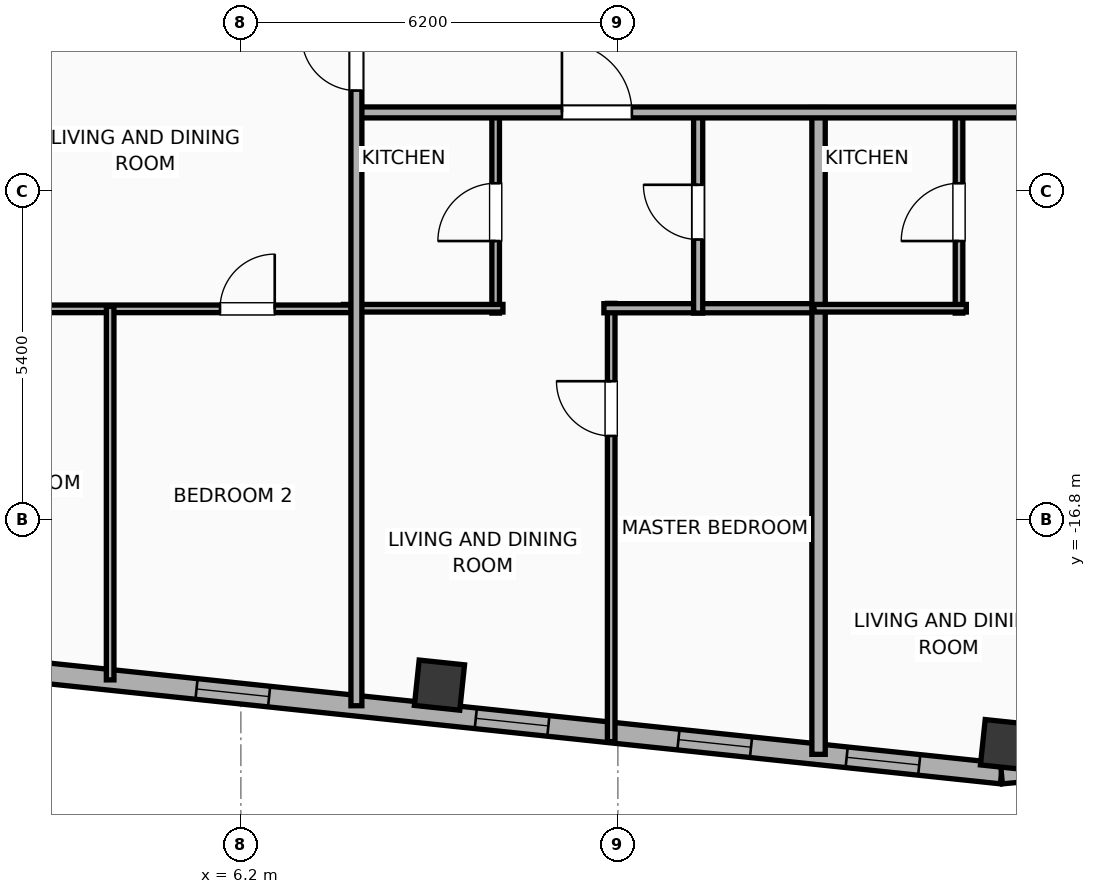
"""IFC4 building model, lengths in metres.
Left out: names, types, materials, properties, quantities, classifications, styles, units other than length and angle.
Written with IfcOpenShell. Run it as: python <this file> out.ifc"""

import sys

from ifc_helpers import new_model, si_unit, direction, frame, frame_2d, origin, origin_2d, place, context, subcontext, project, spatial, rectangle, hollow_rectangle, extrude, element, fill, save


model = new_model("IFC4")
c1 = context("Model", 3, precision=1e-05, world=origin(), true_north=direction((0.0, 1.0)))
c2 = subcontext(c1, "Body", "Model", "MODEL_VIEW")
j1 = project(units=[si_unit("LENGTHUNIT", "METRE"), si_unit("PLANEANGLEUNIT", "RADIAN")], contexts=[c1])
p1 = place(None, origin())
s1 = spatial("IfcSite", under=j1, at=p1, CompositionType="ELEMENT")
p2 = place(p1, origin())
s2 = spatial("IfcBuilding", under=s1, at=p2, CompositionType="ELEMENT")
p3 = place(p2, frame((0.0, 0.0, 271.7)))
s3 = spatial("IfcBuildingStorey", under=s2, at=p3, CompositionType="ELEMENT", Elevation=271.7)
for number, where, z_axis, x_axis in (
    (1, (9.466, -19.518, 0.0), (0.0, 0.0, 1.0), (0.995, -0.105, 0.0)),
    (2, (18.775, -20.497, 0.0), (0.0, 0.0, 1.0), (0.995, -0.105, 0.0)),
):
    element("IfcColumn", number, at=place(p3, frame(where, z_axis=z_axis, x_axis=x_axis)), inside=s3, PredefinedType="COLUMN", context=c2, shape_type="SweptSolid", body=[
        extrude(hollow_rectangle(XDim=0.75, YDim=0.75, WallThickness=0.025, at=origin_2d()), origin(), (0.0, 0.0, 1.0), 3.9),
    ])
p4 = place(p3, frame((18.708, -20.972, 0.0), z_axis=(0.0, 0.0, 1.0), x_axis=(-0.994521888554, 0.104528528102, 0.0)))
e3 = element("IfcWall", 3, at=p4, inside=s3, PredefinedType="ELEMENTEDWALL", context=c2, shape_type="SweptSolid", body=[
    extrude(rectangle(XDim=46.766, YDim=0.34, at=frame_2d((23.383, 0.0))), origin(), (0.0, 0.0, 1.0), 3.65),
])
p5 = place(p4, frame((23.833, 0.0, 0.75)))
e4 = element("IfcOpeningElement", 4, at=p5, cuts=e3, PredefinedType="OPENING", context=c2, shape_type="SweptSolid", body=[
    extrude(rectangle(XDim=2.4, YDim=2.1, at=frame_2d((1.2, 1.05))), frame((0.0, 0.18, 0.0), z_axis=(0.0, -1.0, 0.0), x_axis=(1.0, 0.0, 0.0)), (0.0, 0.0, 1.0), 0.36),
])
p6 = place(p4, frame((38.622, 0.0, 0.75)))
e5 = element("IfcOpeningElement", 5, at=p6, cuts=e3, PredefinedType="OPENING", context=c2, shape_type="SweptSolid", body=[
    extrude(rectangle(XDim=2.4, YDim=2.1, at=frame_2d((1.2, 1.05))), frame((0.0, 0.18, 0.0), z_axis=(0.0, -1.0, 0.0), x_axis=(1.0, 0.0, 0.0)), (0.0, 0.0, 1.0), 0.36),
])
p7 = place(p4, frame((44.402, 0.0, 0.75)))
e6 = element("IfcOpeningElement", 6, at=p7, cuts=e3, PredefinedType="OPENING", context=c2, shape_type="SweptSolid", body=[
    extrude(rectangle(XDim=1.2, YDim=2.05, at=frame_2d((0.6, 1.025))), frame((0.0, 0.18, 0.0), z_axis=(0.0, -1.0, 0.0), x_axis=(1.0, 0.0, 0.0)), (0.0, 0.0, 1.0), 0.36),
])
p8 = place(p4, frame((42.419, 0.0, 0.75)))
e7 = element("IfcOpeningElement", 7, at=p8, cuts=e3, PredefinedType="OPENING", context=c2, shape_type="SweptSolid", body=[
    extrude(rectangle(XDim=1.2, YDim=2.05, at=frame_2d((0.6, 1.025))), frame((0.0, 0.18, 0.0), z_axis=(0.0, -1.0, 0.0), x_axis=(1.0, 0.0, 0.0)), (0.0, 0.0, 1.0), 0.36),
])
p9 = place(p4, frame((34.933, 0.0, 0.75)))
e8 = element("IfcOpeningElement", 8, at=p9, cuts=e3, PredefinedType="OPENING", context=c2, shape_type="SweptSolid", body=[
    extrude(rectangle(XDim=1.2, YDim=2.05, at=frame_2d((0.6, 1.025))), frame((0.0, 0.18, 0.0), z_axis=(0.0, -1.0, 0.0), x_axis=(1.0, 0.0, 0.0)), (0.0, 0.0, 1.0), 0.36),
])
p10 = place(p4, frame((28.692, 0.0, 0.75)))
e9 = element("IfcOpeningElement", 9, at=p10, cuts=e3, PredefinedType="OPENING", context=c2, shape_type="SweptSolid", body=[
    extrude(rectangle(XDim=1.2, YDim=2.05, at=frame_2d((0.6, 1.025))), frame((0.0, 0.18, 0.0), z_axis=(0.0, -1.0, 0.0), x_axis=(1.0, 0.0, 0.0)), (0.0, 0.0, 1.0), 0.36),
])
p11 = place(p4, frame((30.957, 0.0, 0.75)))
e10 = element("IfcOpeningElement", 10, at=p11, cuts=e3, PredefinedType="OPENING", context=c2, shape_type="SweptSolid", body=[
    extrude(rectangle(XDim=1.2, YDim=2.05, at=frame_2d((0.6, 1.025))), frame((0.0, 0.18, 0.0), z_axis=(0.0, -1.0, 0.0), x_axis=(1.0, 0.0, 0.0)), (0.0, 0.0, 1.0), 0.36),
])
p12 = place(p4, frame((7.492, 0.0, 0.75)))
e11 = element("IfcOpeningElement", 11, at=p12, cuts=e3, PredefinedType="OPENING", context=c2, shape_type="SweptSolid", body=[
    extrude(rectangle(XDim=1.2, YDim=2.05, at=frame_2d((0.6, 1.025))), frame((0.0, 0.18, 0.0), z_axis=(0.0, -1.0, 0.0), x_axis=(1.0, 0.0, 0.0)), (0.0, 0.0, 1.0), 0.36),
])
p13 = place(p4, frame((4.141, 0.0, 0.75)))
e12 = element("IfcOpeningElement", 12, at=p13, cuts=e3, PredefinedType="OPENING", context=c2, shape_type="SweptSolid", body=[
    extrude(rectangle(XDim=1.2, YDim=2.05, at=frame_2d((0.6, 1.025))), frame((0.0, 0.18, 0.0), z_axis=(0.0, -1.0, 0.0), x_axis=(1.0, 0.0, 0.0)), (0.0, 0.0, 1.0), 0.36),
])
p14 = place(p4, frame((1.36, 0.0, 0.75)))
e13 = element("IfcOpeningElement", 13, at=p14, cuts=e3, PredefinedType="OPENING", context=c2, shape_type="SweptSolid", body=[
    extrude(rectangle(XDim=1.2, YDim=2.05, at=frame_2d((0.6, 1.025))), frame((0.0, 0.18, 0.0), z_axis=(0.0, -1.0, 0.0), x_axis=(1.0, 0.0, 0.0)), (0.0, 0.0, 1.0), 0.36),
])
p15 = place(p4, frame((20.254, 0.0, 0.75)))
e14 = element("IfcOpeningElement", 14, at=p15, cuts=e3, PredefinedType="OPENING", context=c2, shape_type="SweptSolid", body=[
    extrude(rectangle(XDim=1.2, YDim=2.05, at=frame_2d((0.6, 1.025))), frame((0.0, 0.18, 0.0), z_axis=(0.0, -1.0, 0.0), x_axis=(1.0, 0.0, 0.0)), (0.0, 0.0, 1.0), 0.36),
])
p16 = place(p4, frame((16.172, 0.0, 0.75)))
e15 = element("IfcOpeningElement", 15, at=p16, cuts=e3, PredefinedType="OPENING", context=c2, shape_type="SweptSolid", body=[
    extrude(rectangle(XDim=1.2, YDim=2.05, at=frame_2d((0.6, 1.025))), frame((0.0, 0.18, 0.0), z_axis=(0.0, -1.0, 0.0), x_axis=(1.0, 0.0, 0.0)), (0.0, 0.0, 1.0), 0.36),
])
p17 = place(p4, frame((12.11, 0.0, 0.75)))
e16 = element("IfcOpeningElement", 16, at=p17, cuts=e3, PredefinedType="OPENING", context=c2, shape_type="SweptSolid", body=[
    extrude(rectangle(XDim=1.2, YDim=2.05, at=frame_2d((0.6, 1.025))), frame((0.0, 0.18, 0.0), z_axis=(0.0, -1.0, 0.0), x_axis=(1.0, 0.0, 0.0)), (0.0, 0.0, 1.0), 0.36),
])
p18 = place(p3, frame((20.056, -20.848, 0.0), z_axis=(0.0, 0.0, 1.0), x_axis=(-0.995813013343, -0.091413579172, 0.0)))
e17 = element("IfcWall", 17, at=p18, inside=s3, PredefinedType="ELEMENTEDWALL", context=c2, shape_type="SweptSolid", body=[
    extrude(rectangle(XDim=1.354, YDim=0.34, at=frame_2d((0.677, 0.0))), origin(), (0.0, 0.0, 1.0), 3.65),
])
p19 = place(p3, frame((12.29, -20.448, 0.0), z_axis=(0.0, 0.0, 1.0), x_axis=(0.0, 1.0, 0.0)))
e18 = element("IfcWall", 18, at=p19, inside=s3, PredefinedType="PARTITIONING", context=c2, shape_type="SweptSolid", body=[
    extrude(rectangle(XDim=7.208, YDim=0.125, at=frame_2d((3.604, 0.0))), origin(), (0.0, 0.0, 1.0), 3.65),
])
p20 = place(p19, frame((5.028, 0.0, 0.0)))
e19 = element("IfcOpeningElement", 19, at=p20, cuts=e18, PredefinedType="OPENING", context=c2, shape_type="SweptSolid", body=[
    extrude(rectangle(XDim=0.9, YDim=2.05, at=frame_2d((0.45, 1.025))), frame((0.0, 0.073, 0.0), z_axis=(0.0, -1.0, 0.0), x_axis=(1.0, 0.0, 0.0)), (0.0, 0.0, 1.0), 0.145),
])
p21 = place(p3, frame((12.17, -13.32, 0.0), z_axis=(0.0, 0.0, 1.0), x_axis=(1.0, 0.0, 0.0)))
e20 = element("IfcWall", 20, at=p21, inside=s3, PredefinedType="PLUMBINGWALL", context=c2, shape_type="SweptSolid", body=[
    extrude(rectangle(XDim=3.605, YDim=0.15, at=frame_2d((1.802, 0.0))), origin(), (0.0, 0.0, 1.0), 3.65),
])
p22 = place(p3, frame((10.39, -13.4, 0.0), z_axis=(0.0, 0.0, 1.0), x_axis=(0.0, 1.0, 0.0)))
e21 = element("IfcWall", 21, at=p22, inside=s3, PredefinedType="PARTITIONING", context=c2, shape_type="SweptSolid", body=[
    extrude(rectangle(XDim=3.32, YDim=0.125, at=frame_2d((1.66, 0.0))), origin(), (0.0, 0.0, 1.0), 3.65),
])
p23 = place(p22, frame((1.185, 0.0, 0.0)))
e22 = element("IfcOpeningElement", 22, at=p23, cuts=e21, PredefinedType="OPENING", context=c2, shape_type="SweptSolid", body=[
    extrude(rectangle(XDim=0.95, YDim=2.05, at=frame_2d((0.475, 1.025))), frame((0.0, 0.073, 0.0), z_axis=(0.0, -1.0, 0.0), x_axis=(1.0, 0.0, 0.0)), (0.0, 0.0, 1.0), 0.145),
])
p24 = place(p3, frame((7.887, -13.32, 0.0), z_axis=(0.0, 0.0, 1.0), x_axis=(1.0, 0.0, 0.0)))
e23 = element("IfcWall", 23, at=p24, inside=s3, PredefinedType="PARTITIONING", context=c2, shape_type="SweptSolid", body=[
    extrude(rectangle(XDim=2.623, YDim=0.125, at=frame_2d((1.311, 0.0))), origin(), (0.0, 0.0, 1.0), 3.65),
])
p25 = place(p3, frame((13.72, -13.4, 0.0), z_axis=(0.0, 0.0, 1.0), x_axis=(0.0, 1.0, 0.0)))
e24 = element("IfcWall", 24, at=p25, inside=s3, PredefinedType="PLUMBINGWALL", context=c2, shape_type="SweptSolid", body=[
    extrude(rectangle(XDim=3.32, YDim=0.15, at=frame_2d((1.66, 0.0))), origin(), (0.0, 0.0, 1.0), 3.65),
])
p26 = place(p25, frame((1.21, 0.0, 0.0)))
e25 = element("IfcOpeningElement", 25, at=p26, cuts=e24, PredefinedType="OPENING", context=c2, shape_type="SweptSolid", body=[
    extrude(rectangle(XDim=0.9, YDim=2.05, at=frame_2d((0.45, 1.025))), frame((0.0, 0.085, 0.0), z_axis=(0.0, -1.0, 0.0), x_axis=(1.0, 0.0, 0.0)), (0.0, 0.0, 1.0), 0.17),
])
p27 = place(p3, frame((15.7, -20.656, 0.0), z_axis=(0.0, 0.0, 1.0), x_axis=(0.0, 1.0, 0.0)))
e26 = element("IfcWall", 26, at=p27, inside=s3, PredefinedType="PARTITIONING", context=c2, shape_type="SweptSolid", body=[
    extrude(rectangle(XDim=10.636, YDim=0.22, at=frame_2d((5.318, 0.0))), origin(), (0.0, 0.0, 1.0), 3.65),
])
p28 = place(p3, frame((18.01, -13.4, 0.0), z_axis=(0.0, 0.0, 1.0), x_axis=(0.0, 1.0, 0.0)))
e27 = element("IfcWall", 27, at=p28, inside=s3, PredefinedType="PARTITIONING", context=c2, shape_type="SweptSolid", body=[
    extrude(rectangle(XDim=3.32, YDim=0.125, at=frame_2d((1.66, 0.0))), origin(), (0.0, 0.0, 1.0), 3.65),
])
p29 = place(p28, frame((1.185, 0.0, 0.0)))
e28 = element("IfcOpeningElement", 28, at=p29, cuts=e27, PredefinedType="OPENING", context=c2, shape_type="SweptSolid", body=[
    extrude(rectangle(XDim=0.95, YDim=2.05, at=frame_2d((0.475, 1.025))), frame((0.0, 0.073, 0.0), z_axis=(0.0, -1.0, 0.0), x_axis=(1.0, 0.0, 0.0)), (0.0, 0.0, 1.0), 0.145),
])
p30 = place(p3, frame((15.625, -13.32, 0.0), z_axis=(0.0, 0.0, 1.0), x_axis=(1.0, 0.0, 0.0)))
e29 = element("IfcWall", 29, at=p30, inside=s3, PredefinedType="PARTITIONING", context=c2, shape_type="SweptSolid", body=[
    extrude(rectangle(XDim=2.505, YDim=0.125, at=frame_2d((1.252, 0.0))), origin(), (0.0, 0.0, 1.0), 3.65),
])
p31 = place(p3, frame((8.08, -10.1, 0.0), z_axis=(0.0, 0.0, 1.0), x_axis=(1.0, 0.0, 0.0)))
e30 = element("IfcWall", 30, at=p31, inside=s3, PredefinedType="PARTITIONING", context=c2, shape_type="SweptSolid", body=[
    extrude(rectangle(XDim=15.236, YDim=0.18, at=frame_2d((7.618, 0.0))), origin(), (0.0, 0.0, 1.0), 3.65),
])
p32 = place(p31, frame((3.4, 0.0, 0.0)))
e31 = element("IfcOpeningElement", 31, at=p32, cuts=e30, PredefinedType="OPENING", context=c2, shape_type="SweptSolid", body=[
    extrude(rectangle(XDim=1.15, YDim=2.05, at=frame_2d((0.575, 1.025))), frame((0.0, 0.1, 0.0), z_axis=(0.0, -1.0, 0.0), x_axis=(1.0, 0.0, 0.0)), (0.0, 0.0, 1.0), 0.2),
])
p33 = place(p31, frame((11.05, 0.0, 0.0)))
e32 = element("IfcOpeningElement", 32, at=p33, cuts=e30, PredefinedType="OPENING", context=c2, shape_type="SweptSolid", body=[
    extrude(rectangle(XDim=1.15, YDim=2.05, at=frame_2d((0.575, 1.025))), frame((0.0, 0.1, 0.0), z_axis=(0.0, -1.0, 0.0), x_axis=(1.0, 0.0, 0.0)), (0.0, 0.0, 1.0), 0.2),
])
p34 = place(p3, frame((0.02, -13.33, 0.0), z_axis=(0.0, 0.0, 1.0), x_axis=(1.0, 0.0, 0.0)))
e33 = element("IfcWall", 33, at=p34, inside=s3, PredefinedType="PARTITIONING", context=c2, shape_type="SweptSolid", body=[
    extrude(rectangle(XDim=7.992, YDim=0.125, at=frame_2d((3.996, 0.0))), origin(), (0.0, 0.0, 1.0), 3.65),
])
p35 = place(p34, frame((1.323, 0.0, 0.0)))
e34 = element("IfcOpeningElement", 34, at=p35, cuts=e33, PredefinedType="OPENING", context=c2, shape_type="SweptSolid", body=[
    extrude(rectangle(XDim=0.9, YDim=2.05, at=frame_2d((0.45, 1.025))), frame((0.0, 0.073, 0.0), z_axis=(0.0, -1.0, 0.0), x_axis=(1.0, 0.0, 0.0)), (0.0, 0.0, 1.0), 0.145),
])
p36 = place(p34, frame((5.837, 0.0, 0.0)))
e35 = element("IfcOpeningElement", 35, at=p36, cuts=e33, PredefinedType="OPENING", context=c2, shape_type="SweptSolid", body=[
    extrude(rectangle(XDim=0.9, YDim=2.05, at=frame_2d((0.45, 1.025))), frame((0.0, 0.073, 0.0), z_axis=(0.0, -1.0, 0.0), x_axis=(1.0, 0.0, 0.0)), (0.0, 0.0, 1.0), 0.145),
])
p37 = place(p3, frame((4.05, -19.432, 0.0), z_axis=(0.0, 0.0, 1.0), x_axis=(0.0, 1.0, 0.0)))
e36 = element("IfcWall", 36, at=p37, inside=s3, PredefinedType="PARTITIONING", context=c2, shape_type="SweptSolid", body=[
    extrude(rectangle(XDim=6.142, YDim=0.125, at=frame_2d((3.071, 0.0))), origin(), (0.0, 0.0, 1.0), 3.65),
])
p38 = place(p3, frame((8.1, -19.857, 0.0), z_axis=(0.0, 0.0, 1.0), x_axis=(0.0, 1.0, 0.0)))
e37 = element("IfcWall", 37, at=p38, inside=s3, PredefinedType="PARTITIONING", context=c2, shape_type="SweptSolid", body=[
    extrude(rectangle(XDim=11.367, YDim=0.18, at=frame_2d((5.684, 0.0))), origin(), (0.0, 0.0, 1.0), 3.65),
])
p39 = place(p38, frame((10.117, 0.0, 0.0)))
e38 = element("IfcOpeningElement", 38, at=p39, cuts=e37, PredefinedType="OPENING", context=c2, shape_type="SweptSolid", body=[
    extrude(rectangle(XDim=0.9, YDim=2.05, at=frame_2d((0.45, 1.025))), frame((0.0, 0.1, 0.0), z_axis=(0.0, -1.0, 0.0), x_axis=(1.0, 0.0, 0.0)), (0.0, 0.0, 1.0), 0.2),
])
p40 = place(p12, origin())
e39 = element("IfcWindow", 39, at=p40, inside=s3, PartitioningType="SINGLE_PANEL", PredefinedType="WINDOW", context=c2, shape_type="SweptSolid", body=[
    extrude(rectangle(XDim=1.2, YDim=2.05, at=frame_2d((0.6, 1.025))), frame((0.0, 0.03, 0.0), z_axis=(0.0, -1.0, 0.0), x_axis=(1.0, 0.0, 0.0)), (0.0, 0.0, 1.0), 0.06),
])
fill(e11, e39)
p41 = place(p13, origin())
e40 = element("IfcWindow", 40, at=p41, inside=s3, PartitioningType="SINGLE_PANEL", PredefinedType="WINDOW", context=c2, shape_type="SweptSolid", body=[
    extrude(rectangle(XDim=1.2, YDim=2.05, at=frame_2d((0.6, 1.025))), frame((0.0, 0.03, 0.0), z_axis=(0.0, -1.0, 0.0), x_axis=(1.0, 0.0, 0.0)), (0.0, 0.0, 1.0), 0.06),
])
fill(e12, e40)
p42 = place(p14, origin())
e41 = element("IfcWindow", 41, at=p42, inside=s3, PartitioningType="SINGLE_PANEL", PredefinedType="WINDOW", context=c2, shape_type="SweptSolid", body=[
    extrude(rectangle(XDim=1.2, YDim=2.05, at=frame_2d((0.6, 1.025))), frame((0.0, 0.03, 0.0), z_axis=(0.0, -1.0, 0.0), x_axis=(1.0, 0.0, 0.0)), (0.0, 0.0, 1.0), 0.06),
])
fill(e13, e41)
p43 = place(p17, origin())
e42 = element("IfcWindow", 42, at=p43, inside=s3, PartitioningType="SINGLE_PANEL", PredefinedType="WINDOW", context=c2, shape_type="SweptSolid", body=[
    extrude(rectangle(XDim=1.2, YDim=2.05, at=frame_2d((0.6, 1.025))), frame((0.0, 0.03, 0.0), z_axis=(0.0, -1.0, 0.0), x_axis=(1.0, 0.0, 0.0)), (0.0, 0.0, 1.0), 0.06),
])
fill(e16, e42)
p44 = place(p20, origin())
e43 = element("IfcDoor", 43, at=p44, inside=s3, OperationType="SINGLE_SWING_RIGHT", PredefinedType="DOOR", context=c2, shape_type="SweptSolid", body=[
    extrude(rectangle(XDim=0.9, YDim=2.05, at=frame_2d((0.45, 1.025))), frame((0.0, 0.025, 0.0), z_axis=(0.0, -1.0, 0.0), x_axis=(1.0, 0.0, 0.0)), (0.0, 0.0, 1.0), 0.05),
])
fill(e19, e43)
p45 = place(p23, origin())
e44 = element("IfcDoor", 44, at=p45, inside=s3, OperationType="SINGLE_SWING_LEFT", PredefinedType="DOOR", context=c2, shape_type="SweptSolid", body=[
    extrude(rectangle(XDim=0.95, YDim=2.05, at=frame_2d((0.475, 1.025))), frame((0.0, 0.025, 0.0), z_axis=(0.0, -1.0, 0.0), x_axis=(1.0, 0.0, 0.0)), (0.0, 0.0, 1.0), 0.05),
])
fill(e22, e44)
p46 = place(p26, origin())
e45 = element("IfcDoor", 45, at=p46, inside=s3, OperationType="SINGLE_SWING_RIGHT", PredefinedType="DOOR", context=c2, shape_type="SweptSolid", body=[
    extrude(rectangle(XDim=0.9, YDim=2.05, at=frame_2d((0.45, 1.025))), frame((0.0, 0.025, 0.0), z_axis=(0.0, -1.0, 0.0), x_axis=(1.0, 0.0, 0.0)), (0.0, 0.0, 1.0), 0.05),
])
fill(e25, e45)
p47 = place(p29, origin())
e46 = element("IfcDoor", 46, at=p47, inside=s3, OperationType="SINGLE_SWING_LEFT", PredefinedType="DOOR", context=c2, shape_type="SweptSolid", body=[
    extrude(rectangle(XDim=0.95, YDim=2.05, at=frame_2d((0.475, 1.025))), frame((0.0, 0.025, 0.0), z_axis=(0.0, -1.0, 0.0), x_axis=(1.0, 0.0, 0.0)), (0.0, 0.0, 1.0), 0.05),
])
fill(e28, e46)
p48 = place(p32, origin())
e47 = element("IfcDoor", 47, at=p48, inside=s3, OperationType="SINGLE_SWING_LEFT", PredefinedType="DOOR", context=c2, shape_type="SweptSolid", body=[
    extrude(rectangle(XDim=1.15, YDim=2.05, at=frame_2d((0.575, 1.025))), frame((0.0, 0.025, 0.0), z_axis=(0.0, -1.0, 0.0), x_axis=(1.0, 0.0, 0.0)), (0.0, 0.0, 1.0), 0.05),
])
fill(e31, e47)
p49 = place(p36, origin())
e48 = element("IfcDoor", 48, at=p49, inside=s3, OperationType="SINGLE_SWING_RIGHT", PredefinedType="DOOR", context=c2, shape_type="SweptSolid", body=[
    extrude(rectangle(XDim=0.9, YDim=2.05, at=frame_2d((0.45, 1.025))), frame((0.0, 0.025, 0.0), z_axis=(0.0, -1.0, 0.0), x_axis=(1.0, 0.0, 0.0)), (0.0, 0.0, 1.0), 0.05),
])
fill(e35, e48)
p50 = place(p39, origin())
e49 = element("IfcDoor", 49, at=p50, inside=s3, OperationType="SINGLE_SWING_RIGHT", PredefinedType="DOOR", context=c2, shape_type="SweptSolid", body=[
    extrude(rectangle(XDim=0.9, YDim=2.05, at=frame_2d((0.45, 1.025))), frame((0.0, 0.025, 0.0), z_axis=(0.0, -1.0, 0.0), x_axis=(1.0, 0.0, 0.0)), (0.0, 0.0, 1.0), 0.05),
])
fill(e38, e49)
save(model, sys.argv[1])
